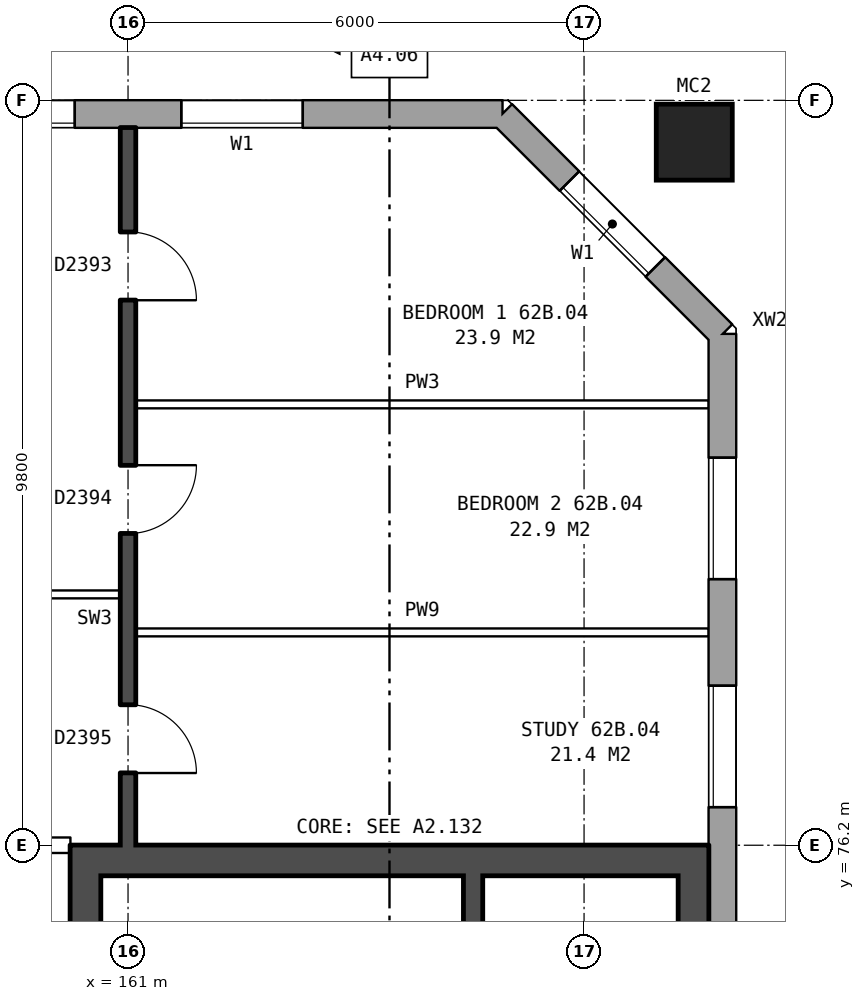
"""IFC4 building model, lengths in metres.
Left out: names, types, materials, properties, quantities, classifications, styles, units other than length and angle.
Written with IfcOpenShell. Run it as: python <this file> out.ifc"""

import sys

from ifc_helpers import new_model, si_unit, direction, frame, frame_2d, origin, origin_2d, place, context, subcontext, project, spatial, rectangle, hollow_rectangle, extrude, element, fill, save


model = new_model("IFC4")
c1 = context("Model", 3, precision=1e-05, world=origin(), true_north=direction((0.0, 1.0)))
c2 = subcontext(c1, "Body", "Model", "MODEL_VIEW")
j1 = project(units=[si_unit("LENGTHUNIT", "METRE"), si_unit("PLANEANGLEUNIT", "RADIAN")], contexts=[c1])
p1 = place(None, origin())
s1 = spatial("IfcSite", under=j1, at=p1, CompositionType="ELEMENT")
p2 = place(p1, origin())
s2 = spatial("IfcBuilding", under=s1, at=p2, CompositionType="ELEMENT")
p3 = place(p2, frame((0.0, 0.0, 221.4)))
s3 = spatial("IfcBuildingStorey", under=s2, at=p3, CompositionType="ELEMENT", Elevation=221.4)
p4 = place(p3, frame((168.45, 85.45, 0.0), z_axis=(0.0, 0.0, 1.0), x_axis=(1.0, 0.0, 0.0)))
e1 = element("IfcColumn", 1, at=p4, inside=s3, PredefinedType="COLUMN", context=c2, shape_type="SweptSolid", body=[
    extrude(hollow_rectangle(XDim=1.0, YDim=1.0, WallThickness=0.055, at=origin_2d()), origin(), (0.0, 0.0, 1.0), 3.1),
])
p5 = place(p3, frame((168.82, 57.075, 0.0), z_axis=(0.0, 0.0, 1.0), x_axis=(0.0, 1.0, 0.0)))
e2 = element("IfcWall", 2, at=p5, inside=s3, PredefinedType="STANDARD", context=c2, shape_type="SweptSolid", body=[
    extrude(rectangle(XDim=25.851, YDim=0.36, at=frame_2d((12.925, 0.0))), origin(), (0.0, 0.0, 1.0), 2.85),
])
p6 = place(p5, frame((1.625, 0.0, 0.8)))
e3 = element("IfcOpeningElement", 3, at=p6, cuts=e2, PredefinedType="OPENING", context=c2, shape_type="SweptSolid", body=[
    extrude(rectangle(XDim=1.6, YDim=1.8, at=frame_2d((0.8, 0.9))), frame((0.0, 0.19, 0.0), z_axis=(0.0, -1.0, 0.0), x_axis=(1.0, 0.0, 0.0)), (0.0, 0.0, 1.0), 0.38),
])
p7 = place(p5, frame((4.625, 0.0, 0.8)))
e4 = element("IfcOpeningElement", 4, at=p7, cuts=e2, PredefinedType="OPENING", context=c2, shape_type="SweptSolid", body=[
    extrude(rectangle(XDim=1.6, YDim=1.8, at=frame_2d((0.8, 0.9))), frame((0.0, 0.19, 0.0), z_axis=(0.0, -1.0, 0.0), x_axis=(1.0, 0.0, 0.0)), (0.0, 0.0, 1.0), 0.38),
])
p8 = place(p5, frame((19.625, 0.0, 0.8)))
e5 = element("IfcOpeningElement", 5, at=p8, cuts=e2, PredefinedType="OPENING", context=c2, shape_type="SweptSolid", body=[
    extrude(rectangle(XDim=1.6, YDim=1.8, at=frame_2d((0.8, 0.9))), frame((0.0, 0.19, 0.0), z_axis=(0.0, -1.0, 0.0), x_axis=(1.0, 0.0, 0.0)), (0.0, 0.0, 1.0), 0.38),
])
p9 = place(p5, frame((22.625, 0.0, 0.8)))
e6 = element("IfcOpeningElement", 6, at=p9, cuts=e2, PredefinedType="OPENING", context=c2, shape_type="SweptSolid", body=[
    extrude(rectangle(XDim=1.6, YDim=1.8, at=frame_2d((0.8, 0.9))), frame((0.0, 0.19, 0.0), z_axis=(0.0, -1.0, 0.0), x_axis=(1.0, 0.0, 0.0)), (0.0, 0.0, 1.0), 0.38),
])
p10 = place(p3, frame((168.82, 82.925, 0.0), z_axis=(0.0, 0.0, 1.0), x_axis=(-0.707106781187, 0.707106781187, 0.0)))
e7 = element("IfcWall", 7, at=p10, inside=s3, PredefinedType="STANDARD", context=c2, shape_type="SweptSolid", body=[
    extrude(rectangle(XDim=4.094, YDim=0.36, at=frame_2d((2.047, 0.0))), origin(), (0.0, 0.0, 1.0), 2.85),
])
p11 = place(p10, frame((1.247, 0.0, 0.8)))
e8 = element("IfcOpeningElement", 8, at=p11, cuts=e7, PredefinedType="OPENING", context=c2, shape_type="SweptSolid", body=[
    extrude(rectangle(XDim=1.6, YDim=1.8, at=frame_2d((0.8, 0.9))), frame((0.0, 0.19, 0.0), z_axis=(0.0, -1.0, 0.0), x_axis=(1.0, 0.0, 0.0)), (0.0, 0.0, 1.0), 0.38),
])
p12 = place(p3, frame((165.925, 85.82, 0.0), z_axis=(0.0, 0.0, 1.0), x_axis=(-1.0, 0.0, 0.0)))
e9 = element("IfcWall", 9, at=p12, inside=s3, PredefinedType="STANDARD", context=c2, shape_type="SweptSolid", body=[
    extrude(rectangle(XDim=33.875, YDim=0.36, at=frame_2d((16.938, 0.0))), origin(), (0.0, 0.0, 1.0), 2.85),
])
p13 = place(p12, frame((2.625, 0.0, 0.8)))
e10 = element("IfcOpeningElement", 10, at=p13, cuts=e9, PredefinedType="OPENING", context=c2, shape_type="SweptSolid", body=[
    extrude(rectangle(XDim=1.6, YDim=1.8, at=frame_2d((0.8, 0.9))), frame((0.0, 0.19, 0.0), z_axis=(0.0, -1.0, 0.0), x_axis=(1.0, 0.0, 0.0)), (0.0, 0.0, 1.0), 0.38),
])
p14 = place(p12, frame((5.625, 0.0, 0.8)))
e11 = element("IfcOpeningElement", 11, at=p14, cuts=e9, PredefinedType="OPENING", context=c2, shape_type="SweptSolid", body=[
    extrude(rectangle(XDim=1.6, YDim=1.8, at=frame_2d((0.8, 0.9))), frame((0.0, 0.19, 0.0), z_axis=(0.0, -1.0, 0.0), x_axis=(1.0, 0.0, 0.0)), (0.0, 0.0, 1.0), 0.38),
])
p15 = place(p12, frame((9.625, 0.0, 0.8)))
e12 = element("IfcOpeningElement", 12, at=p15, cuts=e9, PredefinedType="OPENING", context=c2, shape_type="SweptSolid", body=[
    extrude(rectangle(XDim=1.0, YDim=1.8, at=frame_2d((0.5, 0.9))), frame((0.0, 0.19, 0.0), z_axis=(0.0, -1.0, 0.0), x_axis=(1.0, 0.0, 0.0)), (0.0, 0.0, 1.0), 0.38),
])
p16 = place(p12, frame((11.625, 0.0, 0.8)))
e13 = element("IfcOpeningElement", 13, at=p16, cuts=e9, PredefinedType="OPENING", context=c2, shape_type="SweptSolid", body=[
    extrude(rectangle(XDim=1.6, YDim=1.8, at=frame_2d((0.8, 0.9))), frame((0.0, 0.19, 0.0), z_axis=(0.0, -1.0, 0.0), x_axis=(1.0, 0.0, 0.0)), (0.0, 0.0, 1.0), 0.38),
])
p17 = place(p12, frame((14.625, 0.0, 0.8)))
e14 = element("IfcOpeningElement", 14, at=p17, cuts=e9, PredefinedType="OPENING", context=c2, shape_type="SweptSolid", body=[
    extrude(rectangle(XDim=1.6, YDim=1.8, at=frame_2d((0.8, 0.9))), frame((0.0, 0.19, 0.0), z_axis=(0.0, -1.0, 0.0), x_axis=(1.0, 0.0, 0.0)), (0.0, 0.0, 1.0), 0.38),
])
p18 = place(p12, frame((17.625, 0.0, 0.8)))
e15 = element("IfcOpeningElement", 15, at=p18, cuts=e9, PredefinedType="OPENING", context=c2, shape_type="SweptSolid", body=[
    extrude(rectangle(XDim=1.6, YDim=1.8, at=frame_2d((0.8, 0.9))), frame((0.0, 0.19, 0.0), z_axis=(0.0, -1.0, 0.0), x_axis=(1.0, 0.0, 0.0)), (0.0, 0.0, 1.0), 0.38),
])
p19 = place(p12, frame((20.625, 0.0, 0.8)))
e16 = element("IfcOpeningElement", 16, at=p19, cuts=e9, PredefinedType="OPENING", context=c2, shape_type="SweptSolid", body=[
    extrude(rectangle(XDim=1.6, YDim=1.8, at=frame_2d((0.8, 0.9))), frame((0.0, 0.19, 0.0), z_axis=(0.0, -1.0, 0.0), x_axis=(1.0, 0.0, 0.0)), (0.0, 0.0, 1.0), 0.38),
])
p20 = place(p12, frame((23.825, 0.0, 1.7)))
e17 = element("IfcOpeningElement", 17, at=p20, cuts=e9, PredefinedType="OPENING", context=c2, shape_type="SweptSolid", body=[
    extrude(rectangle(XDim=0.6, YDim=0.9, at=frame_2d((0.3, 0.45))), frame((0.0, 0.19, 0.0), z_axis=(0.0, -1.0, 0.0), x_axis=(1.0, 0.0, 0.0)), (0.0, 0.0, 1.0), 0.38),
])
p21 = place(p12, frame((26.625, 0.0, 0.8)))
e18 = element("IfcOpeningElement", 18, at=p21, cuts=e9, PredefinedType="OPENING", context=c2, shape_type="SweptSolid", body=[
    extrude(rectangle(XDim=1.6, YDim=1.8, at=frame_2d((0.8, 0.9))), frame((0.0, 0.19, 0.0), z_axis=(0.0, -1.0, 0.0), x_axis=(1.0, 0.0, 0.0)), (0.0, 0.0, 1.0), 0.38),
])
p22 = place(p12, frame((29.625, 0.0, 0.8)))
e19 = element("IfcOpeningElement", 19, at=p22, cuts=e9, PredefinedType="OPENING", context=c2, shape_type="SweptSolid", body=[
    extrude(rectangle(XDim=1.6, YDim=1.8, at=frame_2d((0.8, 0.9))), frame((0.0, 0.19, 0.0), z_axis=(0.0, -1.0, 0.0), x_axis=(1.0, 0.0, 0.0)), (0.0, 0.0, 1.0), 0.38),
])
p23 = place(p12, frame((24.725, 0.0, 0.8)))
e20 = element("IfcOpeningElement", 20, at=p23, cuts=e9, PredefinedType="OPENING", context=c2, shape_type="SweptSolid", body=[
    extrude(rectangle(XDim=1.6, YDim=1.8, at=frame_2d((0.8, 0.9))), frame((0.0, 0.19, 0.0), z_axis=(0.0, -1.0, 0.0), x_axis=(1.0, 0.0, 0.0)), (0.0, 0.0, 1.0), 0.38),
])
p24 = place(p3, frame((160.44, 76.2, 0.0), z_axis=(0.0, 0.0, 1.0), x_axis=(0.0, -1.0, 0.0)))
e21 = element("IfcWall", 21, at=p24, inside=s3, PredefinedType="SHEAR", context=c2, shape_type="SweptSolid", body=[
    extrude(rectangle(XDim=12.4, YDim=0.4, at=frame_2d((6.2, 0.0))), origin(), (0.0, 0.0, 1.0), 2.85),
])
p25 = place(p24, frame((1.325, 0.0, 0.0)))
e22 = element("IfcOpeningElement", 22, at=p25, cuts=e21, PredefinedType="OPENING", context=c2, shape_type="SweptSolid", body=[
    extrude(rectangle(XDim=1.1, YDim=2.1, at=frame_2d((0.55, 1.05))), frame((0.0, 0.21, 0.0), z_axis=(0.0, -1.0, 0.0), x_axis=(1.0, 0.0, 0.0)), (0.0, 0.0, 1.0), 0.42),
])
p26 = place(p24, frame((3.625, 0.0, 0.0)))
e23 = element("IfcOpeningElement", 23, at=p26, cuts=e21, PredefinedType="OPENING", context=c2, shape_type="SweptSolid", body=[
    extrude(rectangle(XDim=0.85, YDim=2.1, at=frame_2d((0.425, 1.05))), frame((0.0, 0.21, 0.0), z_axis=(0.0, -1.0, 0.0), x_axis=(1.0, 0.0, 0.0)), (0.0, 0.0, 1.0), 0.42),
])
p27 = place(p24, frame((5.775, 0.0, 0.0)))
e24 = element("IfcOpeningElement", 24, at=p27, cuts=e21, PredefinedType="OPENING", context=c2, shape_type="SweptSolid", body=[
    extrude(rectangle(XDim=0.85, YDim=2.1, at=frame_2d((0.425, 1.05))), frame((0.0, 0.21, 0.0), z_axis=(0.0, -1.0, 0.0), x_axis=(1.0, 0.0, 0.0)), (0.0, 0.0, 1.0), 0.42),
])
p28 = place(p24, frame((9.9, 0.0, 0.0)))
e25 = element("IfcOpeningElement", 25, at=p28, cuts=e21, PredefinedType="OPENING", context=c2, shape_type="SweptSolid", body=[
    extrude(rectangle(XDim=1.1, YDim=2.1, at=frame_2d((0.55, 1.05))), frame((0.0, 0.21, 0.0), z_axis=(0.0, -1.0, 0.0), x_axis=(1.0, 0.0, 0.0)), (0.0, 0.0, 1.0), 0.42),
])
p29 = place(p24, frame((8.125, 0.0, 0.0)))
e26 = element("IfcOpeningElement", 26, at=p29, cuts=e21, PredefinedType="OPENING", context=c2, shape_type="SweptSolid", body=[
    extrude(rectangle(XDim=0.85, YDim=2.1, at=frame_2d((0.425, 1.05))), frame((0.0, 0.21, 0.0), z_axis=(0.0, -1.0, 0.0), x_axis=(1.0, 0.0, 0.0)), (0.0, 0.0, 1.0), 0.42),
])
p30 = place(p3, frame((168.44, 76.2, 0.0), z_axis=(0.0, 0.0, 1.0), x_axis=(0.0, -1.0, 0.0)))
e27 = element("IfcWall", 27, at=p30, inside=s3, PredefinedType="SHEAR", context=c2, shape_type="SweptSolid", body=[
    extrude(rectangle(XDim=12.4, YDim=0.4, at=frame_2d((6.2, 0.0))), origin(), (0.0, 0.0, 1.0), 2.85),
])
p31 = place(p3, frame((160.64, 76.0, 0.0), z_axis=(0.0, 0.0, 1.0), x_axis=(1.0, 0.0, 0.0)))
e28 = element("IfcWall", 28, at=p31, inside=s3, PredefinedType="SHEAR", context=c2, shape_type="SweptSolid", body=[
    extrude(rectangle(XDim=7.6, YDim=0.4, at=frame_2d((3.8, 0.0))), origin(), (0.0, 0.0, 1.0), 2.85),
])
p32 = place(p3, frame((165.54, 75.8, 0.0), z_axis=(0.0, 0.0, 1.0), x_axis=(0.0, -1.0, 0.0)))
e29 = element("IfcWall", 29, at=p32, inside=s3, PredefinedType="SHEAR", context=c2, shape_type="SweptSolid", body=[
    extrude(rectangle(XDim=6.925, YDim=0.25, at=frame_2d((3.462, 0.0))), origin(), (0.0, 0.0, 1.0), 2.85),
])
p33 = place(p3, frame((157.24, 76.2, 0.0), z_axis=(0.0, 0.0, 1.0), x_axis=(1.0, 0.0, 0.0)))
e30 = element("IfcWall", 30, at=p33, inside=s3, PredefinedType="PARTITIONING", context=c2, shape_type="SweptSolid", body=[
    extrude(rectangle(XDim=3.0, YDim=0.2, at=frame_2d((1.5, 0.0))), origin(), (0.0, 0.0, 1.0), 2.85),
])
p34 = place(p33, frame((1.0, 0.0, 0.0)))
e31 = element("IfcOpeningElement", 31, at=p34, cuts=e30, PredefinedType="OPENING", context=c2, shape_type="SweptSolid", body=[
    extrude(rectangle(XDim=1.0, YDim=2.1, at=frame_2d((0.5, 1.05))), frame((0.0, 0.11, 0.0), z_axis=(0.0, -1.0, 0.0), x_axis=(1.0, 0.0, 0.0)), (0.0, 0.0, 1.0), 0.22),
])
p35 = place(p3, frame((161.1, 79.0, 0.0), z_axis=(0.0, 0.0, 1.0), x_axis=(1.0, 0.0, 0.0)))
e32 = element("IfcWall", 32, at=p35, inside=s3, PredefinedType="PARTITIONING", context=c2, shape_type="SweptSolid", body=[
    extrude(rectangle(XDim=7.54, YDim=0.1, at=frame_2d((3.77, 0.0))), origin(), (0.0, 0.0, 1.0), 2.85),
])
p36 = place(p3, frame((155.1, 79.5, 0.0), z_axis=(0.0, 0.0, 1.0), x_axis=(1.0, 0.0, 0.0)))
e33 = element("IfcWall", 33, at=p36, inside=s3, PredefinedType="PARTITIONING", context=c2, shape_type="SweptSolid", body=[
    extrude(rectangle(XDim=5.8, YDim=0.1, at=frame_2d((2.9, 0.0))), origin(), (0.0, 0.0, 1.0), 2.85),
])
p37 = place(p36, frame((3.6, 0.0, 0.0)))
e34 = element("IfcOpeningElement", 34, at=p37, cuts=e33, PredefinedType="OPENING", context=c2, shape_type="SweptSolid", body=[
    extrude(rectangle(XDim=0.9, YDim=2.1, at=frame_2d((0.45, 1.05))), frame((0.0, 0.06, 0.0), z_axis=(0.0, -1.0, 0.0), x_axis=(1.0, 0.0, 0.0)), (0.0, 0.0, 1.0), 0.12),
])
p38 = place(p36, frame((0.7, 0.0, 0.0)))
e35 = element("IfcOpeningElement", 35, at=p38, cuts=e33, PredefinedType="OPENING", context=c2, shape_type="SweptSolid", body=[
    extrude(rectangle(XDim=0.9, YDim=2.1, at=frame_2d((0.45, 1.05))), frame((0.0, 0.06, 0.0), z_axis=(0.0, -1.0, 0.0), x_axis=(1.0, 0.0, 0.0)), (0.0, 0.0, 1.0), 0.12),
])
p39 = place(p3, frame((161.1, 82.0, 0.0), z_axis=(0.0, 0.0, 1.0), x_axis=(1.0, 0.0, 0.0)))
e36 = element("IfcWall", 36, at=p39, inside=s3, PredefinedType="PARTITIONING", context=c2, shape_type="SweptSolid", body=[
    extrude(rectangle(XDim=7.54, YDim=0.1, at=frame_2d((3.77, 0.0))), origin(), (0.0, 0.0, 1.0), 2.85),
])
p40 = place(p3, frame((161.0, 76.2, 0.0), z_axis=(0.0, 0.0, 1.0), x_axis=(0.0, 1.0, 0.0)))
e37 = element("IfcWall", 37, at=p40, inside=s3, PredefinedType="SOLIDWALL", context=c2, shape_type="SweptSolid", body=[
    extrude(rectangle(XDim=9.44, YDim=0.2, at=frame_2d((4.72, 0.0))), origin(), (0.0, 0.0, 1.0), 2.85),
])
p41 = place(p40, frame((7.17, 0.0, 0.0)))
e38 = element("IfcOpeningElement", 38, at=p41, cuts=e37, PredefinedType="OPENING", context=c2, shape_type="SweptSolid", body=[
    extrude(rectangle(XDim=0.9, YDim=2.1, at=frame_2d((0.45, 1.05))), frame((0.0, 0.11, 0.0), z_axis=(0.0, -1.0, 0.0), x_axis=(1.0, 0.0, 0.0)), (0.0, 0.0, 1.0), 0.22),
])
p42 = place(p40, frame((4.1, 0.0, 0.0)))
e39 = element("IfcOpeningElement", 39, at=p42, cuts=e37, PredefinedType="OPENING", context=c2, shape_type="SweptSolid", body=[
    extrude(rectangle(XDim=0.9, YDim=2.1, at=frame_2d((0.45, 1.05))), frame((0.0, 0.11, 0.0), z_axis=(0.0, -1.0, 0.0), x_axis=(1.0, 0.0, 0.0)), (0.0, 0.0, 1.0), 0.22),
])
p43 = place(p40, frame((0.95, 0.0, 0.0)))
e40 = element("IfcOpeningElement", 40, at=p43, cuts=e37, PredefinedType="OPENING", context=c2, shape_type="SweptSolid", body=[
    extrude(rectangle(XDim=0.9, YDim=2.1, at=frame_2d((0.45, 1.05))), frame((0.0, 0.11, 0.0), z_axis=(0.0, -1.0, 0.0), x_axis=(1.0, 0.0, 0.0)), (0.0, 0.0, 1.0), 0.22),
])
p44 = place(p8, origin())
e41 = element("IfcWindow", 41, at=p44, inside=s3, PartitioningType="SINGLE_PANEL", PredefinedType="WINDOW", context=c2, shape_type="SweptSolid", body=[
    extrude(rectangle(XDim=1.6, YDim=1.8, at=frame_2d((0.8, 0.9))), frame((0.0, 0.15, 0.0), z_axis=(0.0, -1.0, 0.0), x_axis=(1.0, 0.0, 0.0)), (0.0, 0.0, 1.0), 0.06),
])
fill(e5, e41)
p45 = place(p9, origin())
e42 = element("IfcWindow", 42, at=p45, inside=s3, PartitioningType="SINGLE_PANEL", PredefinedType="WINDOW", context=c2, shape_type="SweptSolid", body=[
    extrude(rectangle(XDim=1.6, YDim=1.8, at=frame_2d((0.8, 0.9))), frame((0.0, 0.15, 0.0), z_axis=(0.0, -1.0, 0.0), x_axis=(1.0, 0.0, 0.0)), (0.0, 0.0, 1.0), 0.06),
])
fill(e6, e42)
p46 = place(p11, origin())
e43 = element("IfcWindow", 43, at=p46, inside=s3, PartitioningType="SINGLE_PANEL", PredefinedType="WINDOW", context=c2, shape_type="SweptSolid", body=[
    extrude(rectangle(XDim=1.6, YDim=1.8, at=frame_2d((0.8, 0.9))), frame((0.0, 0.15, 0.0), z_axis=(0.0, -1.0, 0.0), x_axis=(1.0, 0.0, 0.0)), (0.0, 0.0, 1.0), 0.06),
])
fill(e8, e43)
p47 = place(p13, origin())
e44 = element("IfcWindow", 44, at=p47, inside=s3, PartitioningType="SINGLE_PANEL", PredefinedType="WINDOW", context=c2, shape_type="SweptSolid", body=[
    extrude(rectangle(XDim=1.6, YDim=1.8, at=frame_2d((0.8, 0.9))), frame((0.0, 0.15, 0.0), z_axis=(0.0, -1.0, 0.0), x_axis=(1.0, 0.0, 0.0)), (0.0, 0.0, 1.0), 0.06),
])
fill(e10, e44)
p48 = place(p14, origin())
e45 = element("IfcWindow", 45, at=p48, inside=s3, PartitioningType="SINGLE_PANEL", PredefinedType="WINDOW", context=c2, shape_type="SweptSolid", body=[
    extrude(rectangle(XDim=1.6, YDim=1.8, at=frame_2d((0.8, 0.9))), frame((0.0, 0.15, 0.0), z_axis=(0.0, -1.0, 0.0), x_axis=(1.0, 0.0, 0.0)), (0.0, 0.0, 1.0), 0.06),
])
fill(e11, e45)
p49 = place(p41, frame((0.9, 0.0, 0.0), z_axis=(0.0, 0.0, 1.0), x_axis=(-1.0, 0.0, 0.0)))
e46 = element("IfcDoor", 46, at=p49, inside=s3, OperationType="SINGLE_SWING_RIGHT", PredefinedType="DOOR", context=c2, shape_type="SweptSolid", body=[
    extrude(rectangle(XDim=0.9, YDim=2.1, at=frame_2d((0.45, 1.05))), frame((0.0, 0.025, 0.0), z_axis=(0.0, -1.0, 0.0), x_axis=(1.0, 0.0, 0.0)), (0.0, 0.0, 1.0), 0.05),
])
fill(e38, e46)
p50 = place(p42, frame((0.9, 0.0, 0.0), z_axis=(0.0, 0.0, 1.0), x_axis=(-1.0, 0.0, 0.0)))
e47 = element("IfcDoor", 47, at=p50, inside=s3, OperationType="SINGLE_SWING_LEFT", PredefinedType="DOOR", context=c2, shape_type="SweptSolid", body=[
    extrude(rectangle(XDim=0.9, YDim=2.1, at=frame_2d((0.45, 1.05))), frame((0.0, 0.025, 0.0), z_axis=(0.0, -1.0, 0.0), x_axis=(1.0, 0.0, 0.0)), (0.0, 0.0, 1.0), 0.05),
])
fill(e39, e47)
p51 = place(p43, frame((0.9, 0.0, 0.0), z_axis=(0.0, 0.0, 1.0), x_axis=(-1.0, 0.0, 0.0)))
e48 = element("IfcDoor", 48, at=p51, inside=s3, OperationType="SINGLE_SWING_RIGHT", PredefinedType="DOOR", context=c2, shape_type="SweptSolid", body=[
    extrude(rectangle(XDim=0.9, YDim=2.1, at=frame_2d((0.45, 1.05))), frame((0.0, 0.025, 0.0), z_axis=(0.0, -1.0, 0.0), x_axis=(1.0, 0.0, 0.0)), (0.0, 0.0, 1.0), 0.05),
])
fill(e40, e48)
save(model, sys.argv[1])
